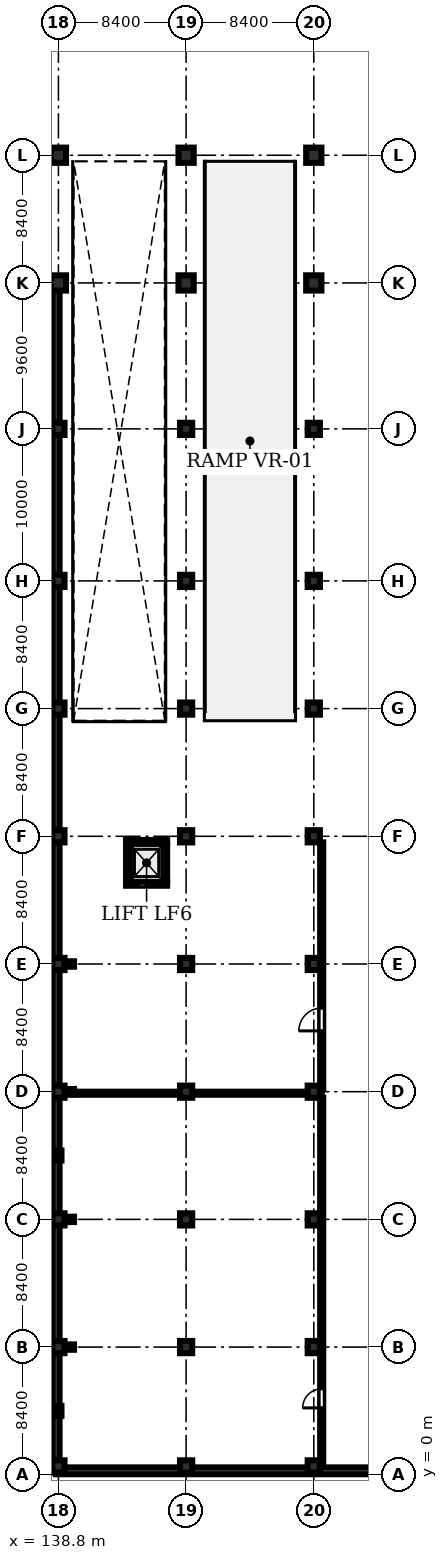
"""IFC4 building model, lengths in metres.
Left out: names, types, materials, properties, quantities, classifications, styles, units other than length and angle.
Written with IfcOpenShell. Run it as: python <this file> out.ifc"""

import sys

from ifc_helpers import new_model, si_unit, direction, frame, frame_2d, origin, origin_2d, place, context, subcontext, project, spatial, rectangle, i_section, extrude, element, fill, save


model = new_model("IFC4")
c1 = context("Model", 3, precision=1e-05, world=origin(), true_north=direction((0.0, 1.0)))
c2 = subcontext(c1, "Body", "Model", "MODEL_VIEW")
j1 = project(units=[si_unit("LENGTHUNIT", "METRE"), si_unit("PLANEANGLEUNIT", "RADIAN")], contexts=[c1])
p1 = place(None, origin())
s1 = spatial("IfcSite", under=j1, at=p1, CompositionType="ELEMENT")
p2 = place(p1, origin())
s2 = spatial("IfcBuilding", under=s1, at=p2, CompositionType="ELEMENT")
p3 = place(p2, frame((0.0, 0.0, -4.8)))
s3 = spatial("IfcBuildingStorey", under=s2, at=p3, CompositionType="ELEMENT", Elevation=-4.8)
for number, where, z_axis, x_axis in (
    (1, (138.8, 0.55, 0.0), (0.0, 0.0, 1.0), (1.0, 0.0, 0.0)),
    (2, (138.8, 8.4, 0.0), (0.0, 0.0, 1.0), (1.0, 0.0, 0.0)),
    (3, (138.8, 16.8, 0.0), (0.0, 0.0, 1.0), (1.0, 0.0, 0.0)),
    (4, (138.8, 25.2, 0.0), (0.0, 0.0, 1.0), (1.0, 0.0, 0.0)),
    (5, (138.8, 33.6, 0.0), (0.0, 0.0, 1.0), (1.0, 0.0, 0.0)),
    (6, (138.8, 42.0, 0.0), (0.0, 0.0, 1.0), (1.0, 0.0, 0.0)),
    (7, (138.8, 50.4, 0.0), (0.0, 0.0, 1.0), (1.0, 0.0, 0.0)),
    (8, (138.8, 58.8, 0.0), (0.0, 0.0, 1.0), (1.0, 0.0, 0.0)),
    (9, (138.8, 68.8, 0.0), (0.0, 0.0, 1.0), (1.0, 0.0, 0.0)),
):
    element("IfcColumn", number, at=place(p3, frame(where, z_axis=z_axis, x_axis=x_axis)), inside=s3, PredefinedType="COLUMN", context=c2, shape_type="SweptSolid", body=[
        extrude(rectangle(XDim=0.8, YDim=0.8, at=origin_2d()), origin(), (0.0, 0.0, 1.0), 4.395),
    ])
for number, where, z_axis, x_axis in (
    (10, (138.8, 78.4, 0.0), (0.0, 0.0, 1.0), (1.0, 0.0, 0.0)),
    (11, (138.8, 86.8, 0.0), (0.0, 0.0, 1.0), (1.0, 0.0, 0.0)),
):
    element("IfcColumn", number, at=place(p3, frame(where, z_axis=z_axis, x_axis=x_axis)), inside=s3, PredefinedType="COLUMN", context=c2, shape_type="SweptSolid", body=[
        extrude(rectangle(XDim=1.0, YDim=1.0, at=origin_2d()), origin(), (0.0, 0.0, 1.0), 4.395),
    ])
for number, where, z_axis, x_axis in (
    (12, (147.2, 0.55, 0.0), (0.0, 0.0, 1.0), (1.0, 0.0, 0.0)),
    (13, (147.2, 8.4, 0.0), (0.0, 0.0, 1.0), (1.0, 0.0, 0.0)),
    (14, (147.2, 16.8, 0.0), (0.0, 0.0, 1.0), (1.0, 0.0, 0.0)),
    (15, (147.2, 25.2, 0.0), (0.0, 0.0, 1.0), (1.0, 0.0, 0.0)),
    (16, (147.2, 33.6, 0.0), (0.0, 0.0, 1.0), (1.0, 0.0, 0.0)),
    (17, (147.2, 42.0, 0.0), (0.0, 0.0, 1.0), (1.0, 0.0, 0.0)),
    (18, (147.2, 50.4, 0.0), (0.0, 0.0, 1.0), (1.0, 0.0, 0.0)),
    (19, (147.2, 58.8, 0.0), (0.0, 0.0, 1.0), (1.0, 0.0, 0.0)),
    (20, (147.2, 68.8, 0.0), (0.0, 0.0, 1.0), (1.0, 0.0, 0.0)),
):
    element("IfcColumn", number, at=place(p3, frame(where, z_axis=z_axis, x_axis=x_axis)), inside=s3, PredefinedType="COLUMN", context=c2, shape_type="SweptSolid", body=[
        extrude(rectangle(XDim=0.8, YDim=0.8, at=origin_2d()), origin(), (0.0, 0.0, 1.0), 4.395),
    ])
for number, where, z_axis, x_axis in (
    (21, (147.2, 78.4, 0.0), (0.0, 0.0, 1.0), (1.0, 0.0, 0.0)),
    (22, (147.2, 86.8, 0.0), (0.0, 0.0, 1.0), (1.0, 0.0, 0.0)),
):
    element("IfcColumn", number, at=place(p3, frame(where, z_axis=z_axis, x_axis=x_axis)), inside=s3, PredefinedType="COLUMN", context=c2, shape_type="SweptSolid", body=[
        extrude(rectangle(XDim=1.0, YDim=1.0, at=origin_2d()), origin(), (0.0, 0.0, 1.0), 4.395),
    ])
for number, where, z_axis, x_axis in (
    (23, (155.6, 0.55, 0.0), (0.0, 0.0, 1.0), (1.0, 0.0, 0.0)),
    (24, (155.6, 8.4, 0.0), (0.0, 0.0, 1.0), (1.0, 0.0, 0.0)),
    (25, (155.6, 16.8, 0.0), (0.0, 0.0, 1.0), (1.0, 0.0, 0.0)),
    (26, (155.6, 25.2, 0.0), (0.0, 0.0, 1.0), (1.0, 0.0, 0.0)),
    (27, (155.6, 33.6, 0.0), (0.0, 0.0, 1.0), (1.0, 0.0, 0.0)),
    (28, (155.6, 42.0, 0.0), (0.0, 0.0, 1.0), (1.0, 0.0, 0.0)),
    (29, (155.6, 50.4, 0.0), (0.0, 0.0, 1.0), (1.0, 0.0, 0.0)),
    (30, (155.6, 58.8, 0.0), (0.0, 0.0, 1.0), (1.0, 0.0, 0.0)),
    (31, (155.6, 68.8, 0.0), (0.0, 0.0, 1.0), (1.0, 0.0, 0.0)),
):
    element("IfcColumn", number, at=place(p3, frame(where, z_axis=z_axis, x_axis=x_axis)), inside=s3, PredefinedType="COLUMN", context=c2, shape_type="SweptSolid", body=[
        extrude(rectangle(XDim=0.8, YDim=0.8, at=origin_2d()), origin(), (0.0, 0.0, 1.0), 4.395),
    ])
for number, where, z_axis, x_axis in (
    (32, (155.6, 78.4, 0.0), (0.0, 0.0, 1.0), (1.0, 0.0, 0.0)),
    (33, (155.6, 86.8, 0.0), (0.0, 0.0, 1.0), (1.0, 0.0, 0.0)),
):
    element("IfcColumn", number, at=place(p3, frame(where, z_axis=z_axis, x_axis=x_axis)), inside=s3, PredefinedType="COLUMN", context=c2, shape_type="SweptSolid", body=[
        extrude(rectangle(XDim=1.0, YDim=1.0, at=origin_2d()), origin(), (0.0, 0.0, 1.0), 4.395),
    ])
for number, where, z_axis, x_axis in (
    (34, (138.8, 4.2, 0.0), (0.0, 0.0, 1.0), (1.0, 0.0, 0.0)),
    (35, (138.8, 21.0, 0.0), (0.0, 0.0, 1.0), (1.0, 0.0, 0.0)),
):
    element("IfcColumn", number, at=place(p3, frame(where, z_axis=z_axis, x_axis=x_axis)), inside=s3, PredefinedType="PILASTER", context=c2, shape_type="SweptSolid", body=[
        extrude(rectangle(XDim=0.4, YDim=0.65, at=origin_2d()), origin(), (0.0, 0.0, 1.0), 4.395),
    ])
p4 = place(p3, frame((0.26, 78.25, 0.0), z_axis=(0.0, 0.0, 1.0), x_axis=(1.0, 0.0, 0.0)))
e36 = element("IfcWall", 36, at=p4, inside=s3, PredefinedType="SHEAR", context=c2, shape_type="SweptSolid", body=[
    extrude(rectangle(XDim=138.39, YDim=0.45, at=frame_2d((69.195, 0.0))), origin(), (0.0, 0.0, 1.0), 3.75),
])
p5 = place(p3, frame((138.65, 78.25, 0.0), z_axis=(0.0, 0.0, 1.0), x_axis=(0.0, -1.0, 0.0)))
e37 = element("IfcWall", 37, at=p5, inside=s3, PredefinedType="SHEAR", context=c2, shape_type="SweptSolid", body=[
    extrude(rectangle(XDim=77.99, YDim=0.45, at=frame_2d((38.995, 0.0))), origin(), (0.0, 0.0, 1.0), 3.75),
])
p6 = place(p3, frame((138.65, 0.26, 0.0), z_axis=(0.0, 0.0, 1.0), x_axis=(1.0, 0.0, 0.0)))
e38 = element("IfcWall", 38, at=p6, inside=s3, PredefinedType="SHEAR", context=c2, shape_type="SweptSolid", body=[
    extrude(rectangle(XDim=25.09, YDim=0.45, at=frame_2d((12.545, 0.0))), origin(), (0.0, 0.0, 1.0), 3.75),
])
p7 = place(p3, frame((143.25, 38.875, 0.0), z_axis=(0.0, 0.0, 1.0), x_axis=(1.0, 0.0, 0.0)))
e39 = element("IfcWall", 39, at=p7, inside=s3, PredefinedType="SHEAR", context=c2, shape_type="SweptSolid", body=[
    extrude(rectangle(XDim=2.7, YDim=0.25, at=frame_2d((1.35, 0.0))), origin(), (0.0, 0.0, 1.0), 4.395),
])
p8 = place(p7, frame((0.835, 0.0, 0.0)))
e40 = element("IfcOpeningElement", 40, at=p8, cuts=e39, PredefinedType="OPENING", context=c2, shape_type="SweptSolid", body=[
    extrude(rectangle(XDim=1.03, YDim=2.15, at=frame_2d((0.515, 1.075))), frame((0.0, 0.135, 0.0), z_axis=(0.0, -1.0, 0.0), x_axis=(1.0, 0.0, 0.0)), (0.0, 0.0, 1.0), 0.27),
])
p9 = place(p3, frame((143.25, 41.625, 0.0), z_axis=(0.0, 0.0, 1.0), x_axis=(1.0, 0.0, 0.0)))
e41 = element("IfcWall", 41, at=p9, inside=s3, PredefinedType="SHEAR", context=c2, shape_type="SweptSolid", body=[
    extrude(rectangle(XDim=2.7, YDim=0.25, at=frame_2d((1.35, 0.0))), origin(), (0.0, 0.0, 1.0), 4.395),
])
for number, where, z_axis, x_axis in (
    (42, (143.375, 39.0, 0.0), (0.0, 0.0, 1.0), (0.0, 1.0, 0.0)),
    (43, (145.825, 39.0, 0.0), (0.0, 0.0, 1.0), (0.0, 1.0, 0.0)),
):
    element("IfcWall", number, at=place(p3, frame(where, z_axis=z_axis, x_axis=x_axis)), inside=s3, PredefinedType="SHEAR", context=c2, shape_type="SweptSolid", body=[
        extrude(rectangle(XDim=2.5, YDim=0.25, at=frame_2d((1.25, 0.0))), origin(), (0.0, 0.0, 1.0), 4.395),
    ])
for number, where, z_axis, x_axis in (
    (44, (139.65, 8.4, 0.0), (0.0, 0.0, 1.0), (1.0, 0.0, 0.0)),
    (45, (139.65, 16.8, 0.0), (0.0, 0.0, 1.0), (1.0, 0.0, 0.0)),
    (46, (139.65, 25.2, 0.0), (0.0, 0.0, 1.0), (1.0, 0.0, 0.0)),
    (47, (139.65, 33.6, 0.0), (0.0, 0.0, 1.0), (1.0, 0.0, 0.0)),
):
    element("IfcColumn", number, at=place(p3, frame(where, z_axis=z_axis, x_axis=x_axis)), inside=s3, PredefinedType="COLUMN", context=c2, shape_type="SweptSolid", body=[
        extrude(i_section(OverallWidth=0.35, OverallDepth=0.35, WebThickness=0.012, FlangeThickness=0.019, at=origin_2d()), origin(), (0.0, 0.0, 1.0), 4.395),
    ])
p10 = place(p3, frame((156.12, 0.6, 0.0), z_axis=(0.0, 0.0, 1.0), x_axis=(0.0, 1.0, 0.0)))
e48 = element("IfcWall", 48, at=p10, inside=s3, PredefinedType="SOLIDWALL", context=c2, shape_type="SweptSolid", body=[
    extrude(rectangle(XDim=24.2, YDim=0.2, at=frame_2d((12.1, 0.0))), origin(), (0.0, 0.0, 1.0), 4.395),
])
p11 = place(p10, frame((3.8, 0.0, 0.0)))
e49 = element("IfcOpeningElement", 49, at=p11, cuts=e48, PredefinedType="OPENING", context=c2, shape_type="SweptSolid", body=[
    extrude(rectangle(XDim=1.25, YDim=2.2, at=frame_2d((0.625, 1.1))), frame((0.0, 0.11, 0.0), z_axis=(0.0, -1.0, 0.0), x_axis=(1.0, 0.0, 0.0)), (0.0, 0.0, 1.0), 0.22),
])
p12 = place(p3, frame((156.12, 25.4, 0.0), z_axis=(0.0, 0.0, 1.0), x_axis=(0.0, 1.0, 0.0)))
e50 = element("IfcWall", 50, at=p12, inside=s3, PredefinedType="SOLIDWALL", context=c2, shape_type="SweptSolid", body=[
    extrude(rectangle(XDim=16.2, YDim=0.2, at=frame_2d((8.1, 0.0))), origin(), (0.0, 0.0, 1.0), 4.395),
])
p13 = place(p12, frame((3.8, 0.0, 0.0)))
e51 = element("IfcOpeningElement", 51, at=p13, cuts=e50, PredefinedType="OPENING", context=c2, shape_type="SweptSolid", body=[
    extrude(rectangle(XDim=1.5, YDim=2.2, at=frame_2d((0.75, 1.1))), frame((0.0, 0.11, 0.0), z_axis=(0.0, -1.0, 0.0), x_axis=(1.0, 0.0, 0.0)), (0.0, 0.0, 1.0), 0.22),
])
p14 = place(p3, frame((139.3, 25.1, 0.0), z_axis=(0.0, 0.0, 1.0), x_axis=(1.0, 0.0, 0.0)))
e52 = element("IfcWall", 52, at=p14, inside=s3, PredefinedType="SOLIDWALL", context=c2, shape_type="SweptSolid", body=[
    extrude(rectangle(XDim=16.82, YDim=0.2, at=frame_2d((8.41, 0.0))), origin(), (0.0, 0.0, 1.0), 3.595),
])
p15 = place(p11, origin())
e53 = element("IfcDoor", 53, at=p15, inside=s3, OperationType="SINGLE_SWING_LEFT", PredefinedType="DOOR", context=c2, shape_type="SweptSolid", body=[
    extrude(rectangle(XDim=1.25, YDim=2.2, at=frame_2d((0.625, 1.1))), frame((0.0, 0.025, 0.0), z_axis=(0.0, -1.0, 0.0), x_axis=(1.0, 0.0, 0.0)), (0.0, 0.0, 1.0), 0.05),
])
fill(e49, e53)
p16 = place(p13, origin())
e54 = element("IfcDoor", 54, at=p16, inside=s3, OperationType="SINGLE_SWING_LEFT", PredefinedType="DOOR", context=c2, shape_type="SweptSolid", body=[
    extrude(rectangle(XDim=1.5, YDim=2.2, at=frame_2d((0.75, 1.1))), frame((0.0, 0.025, 0.0), z_axis=(0.0, -1.0, 0.0), x_axis=(1.0, 0.0, 0.0)), (0.0, 0.0, 1.0), 0.05),
])
fill(e51, e54)
p17 = place(p8, origin())
e55 = element("IfcDoor", 55, at=p17, inside=s3, OperationType="SLIDING_TO_LEFT", PredefinedType="DOOR", context=c2, shape_type="SweptSolid", body=[
    extrude(rectangle(XDim=1.03, YDim=2.15, at=frame_2d((0.515, 1.075))), frame((0.0, 0.025, 0.0), z_axis=(0.0, -1.0, 0.0), x_axis=(1.0, 0.0, 0.0)), (0.0, 0.0, 1.0), 0.05),
])
fill(e40, e55)
save(model, sys.argv[1])
